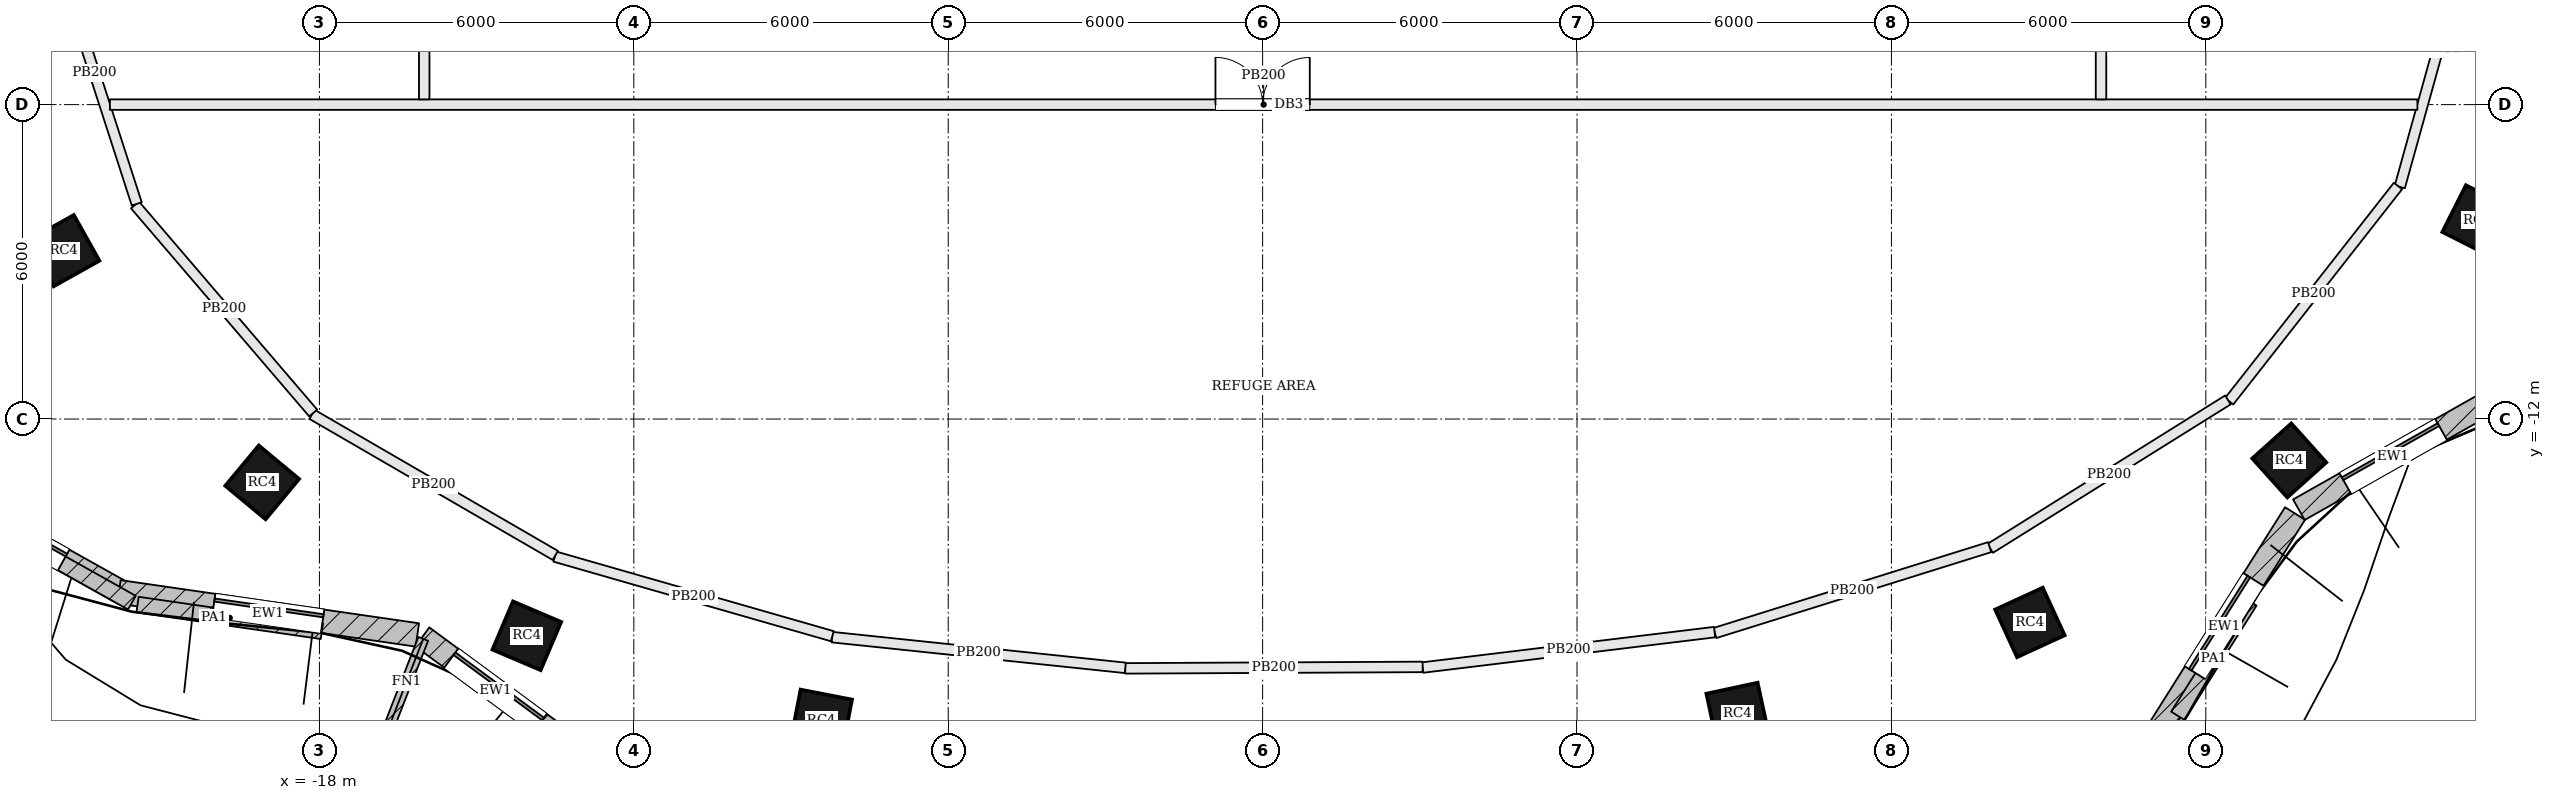
"""IFC4 building model, lengths in metres.
Left out: names, types, materials, properties, quantities, classifications, styles, units other than length and angle.
Written with IfcOpenShell. Run it as: python <this file> out.ifc"""

import sys

from ifc_helpers import new_model, si_unit, direction, frame, frame_2d, origin, origin_2d, place, context, subcontext, project, spatial, rectangle, extrude, element, fill, save


model = new_model("IFC4")
c1 = context("Model", 3, precision=1e-05, world=origin(), true_north=direction((0.0, 1.0)))
c2 = subcontext(c1, "Body", "Model", "MODEL_VIEW")
j1 = project(units=[si_unit("LENGTHUNIT", "METRE"), si_unit("PLANEANGLEUNIT", "RADIAN")], contexts=[c1])
p1 = place(None, origin())
s1 = spatial("IfcSite", under=j1, at=p1, CompositionType="ELEMENT")
p2 = place(p1, origin())
s2 = spatial("IfcBuilding", under=s1, at=p2, CompositionType="ELEMENT")
p3 = place(p2, frame((0.0, 0.0, 193.5)))
s3 = spatial("IfcBuildingStorey", under=s2, at=p3, CompositionType="ELEMENT", Elevation=193.5)
for number, where, z_axis, x_axis in (
    (1, (-22.879, -8.787, 0.0), (0.0, 0.0, 1.0), (0.489, -0.873, 0.0)),
    (2, (-19.092, -13.209, 0.0), (0.0, 0.0, 1.0), (0.769, -0.639, 0.0)),
    (3, (-14.042, -16.136, 0.0), (0.0, 0.0, 1.0), (0.92, -0.392, 0.0)),
    (4, (-8.422, -17.749, 0.0), (0.0, 0.0, 1.0), (0.982, -0.191, 0.0)),
    (5, (9.063, -17.625, 0.0), (0.0, 0.0, 1.0), (0.978, 0.21, 0.0)),
    (6, (14.643, -15.881, 0.0), (0.0, 0.0, 1.0), (0.909, 0.417, 0.0)),
    (7, (19.593, -12.79, 0.0), (0.0, 0.0, 1.0), (0.744, 0.668, 0.0)),
    (8, (23.185, -8.21, 0.0), (0.0, 0.0, 1.0), (0.451, 0.893, 0.0)),
):
    element("IfcColumn", number, at=place(p3, frame(where, z_axis=z_axis, x_axis=x_axis)), inside=s3, PredefinedType="COLUMN", context=c2, shape_type="SweptSolid", body=[
        extrude(rectangle(XDim=1.0, YDim=1.0, at=origin_2d()), origin(), (0.0, 0.0, 1.0), 3.9),
    ])
p4 = place(p3, frame((-25.844, -13.028, 0.0), z_axis=(0.0, 0.0, 1.0), x_axis=(0.872346398261, -0.488888291373, 0.0)))
e9 = element("IfcWall", 9, at=p4, inside=s3, PredefinedType="SOLIDWALL", context=c2, shape_type="SweptSolid", body=[
    extrude(rectangle(XDim=4.696, YDim=0.45, at=frame_2d((2.348, 0.0))), origin(), (0.0, 0.0, 1.0), 3.7),
])
p5 = place(p4, frame((1.298, 0.0, 0.9)))
e10 = element("IfcOpeningElement", 10, at=p5, cuts=e9, PredefinedType="OPENING", context=c2, shape_type="SweptSolid", body=[
    extrude(rectangle(XDim=2.1, YDim=2.3, at=frame_2d((1.05, 1.15))), frame((0.0, 0.235, 0.0), z_axis=(0.0, -1.0, 0.0), x_axis=(1.0, 0.0, 0.0)), (0.0, 0.0, 1.0), 0.47),
])
p6 = place(p3, frame((-21.825, -15.297, 0.0), z_axis=(0.0, 0.0, 1.0), x_axis=(0.98971474215, -0.143054986527, 0.0)))
e11 = element("IfcWall", 11, at=p6, inside=s3, PredefinedType="SOLIDWALL", context=c2, shape_type="SweptSolid", body=[
    extrude(rectangle(XDim=5.753, YDim=0.45, at=frame_2d((2.876, 0.0))), origin(), (0.0, 0.0, 1.0), 3.7),
])
p7 = place(p6, frame((1.826, 0.0, 0.9)))
e12 = element("IfcOpeningElement", 12, at=p7, cuts=e11, PredefinedType="OPENING", context=c2, shape_type="SweptSolid", body=[
    extrude(rectangle(XDim=2.1, YDim=2.3, at=frame_2d((1.05, 1.15))), frame((0.0, 0.235, 0.0), z_axis=(0.0, -1.0, 0.0), x_axis=(1.0, 0.0, 0.0)), (0.0, 0.0, 1.0), 0.47),
])
p8 = place(p3, frame((-16.036, -16.158, 0.0), z_axis=(0.0, 0.0, 1.0), x_axis=(0.805181432967, -0.593028549064, 0.0)))
e13 = element("IfcWall", 13, at=p8, inside=s3, PredefinedType="SOLIDWALL", context=c2, shape_type="SweptSolid", body=[
    extrude(rectangle(XDim=3.469, YDim=0.45, at=frame_2d((1.734, 0.0))), origin(), (0.0, 0.0, 1.0), 3.7),
])
p9 = place(p8, frame((0.684, 0.0, 0.9)))
e14 = element("IfcOpeningElement", 14, at=p9, cuts=e13, PredefinedType="OPENING", context=c2, shape_type="SweptSolid", body=[
    extrude(rectangle(XDim=2.1, YDim=2.3, at=frame_2d((1.05, 1.15))), frame((0.0, 0.235, 0.0), z_axis=(0.0, -1.0, 0.0), x_axis=(1.0, 0.0, 0.0)), (0.0, 0.0, 1.0), 0.47),
])
p10 = place(p3, frame((16.998, -18.099, 0.0), z_axis=(0.0, 0.0, 1.0), x_axis=(0.532745661304, 0.846275404559, 0.0)))
e15 = element("IfcWall", 15, at=p10, inside=s3, PredefinedType="SOLIDWALL", context=c2, shape_type="SweptSolid", body=[
    extrude(rectangle(XDim=5.076, YDim=0.45, at=frame_2d((2.538, 0.0))), origin(), (0.0, 0.0, 1.0), 3.7),
])
p11 = place(p10, frame((1.488, 0.0, 0.9)))
e16 = element("IfcOpeningElement", 16, at=p11, cuts=e15, PredefinedType="OPENING", context=c2, shape_type="SweptSolid", body=[
    extrude(rectangle(XDim=2.1, YDim=2.3, at=frame_2d((1.05, 1.15))), frame((0.0, 0.235, 0.0), z_axis=(0.0, -1.0, 0.0), x_axis=(1.0, 0.0, 0.0)), (0.0, 0.0, 1.0), 0.47),
])
p12 = place(p3, frame((19.776, -13.731, 0.0), z_axis=(0.0, 0.0, 1.0), x_axis=(0.870610133829, 0.491973571318, 0.0)))
e17 = element("IfcWall", 17, at=p12, inside=s3, PredefinedType="SOLIDWALL", context=c2, shape_type="SweptSolid", body=[
    extrude(rectangle(XDim=4.134, YDim=0.45, at=frame_2d((2.067, 0.0))), origin(), (0.0, 0.0, 1.0), 3.7),
])
p13 = place(p12, frame((1.017, 0.0, 0.9)))
e18 = element("IfcOpeningElement", 18, at=p13, cuts=e17, PredefinedType="OPENING", context=c2, shape_type="SweptSolid", body=[
    extrude(rectangle(XDim=2.1, YDim=2.3, at=frame_2d((1.05, 1.15))), frame((0.0, 0.235, 0.0), z_axis=(0.0, -1.0, 0.0), x_axis=(1.0, 0.0, 0.0)), (0.0, 0.0, 1.0), 0.47),
])
p14 = place(p3, frame((-16.019, -16.195, 0.0), z_axis=(0.0, 0.0, 1.0), x_axis=(-0.362641522028, -0.931928713208, 0.0)))
e19 = element("IfcWall", 19, at=p14, inside=s3, PredefinedType="SOLIDWALL", context=c2, shape_type="SweptSolid", body=[
    extrude(rectangle(XDim=1.75, YDim=0.2, at=frame_2d((0.875, 0.0))), origin(), (0.0, 0.0, 1.0), 3.7),
])
p15 = place(p3, frame((-25.734, -13.176, 3.9), z_axis=(0.0, 0.0, 1.0), x_axis=(0.872345142407, -0.488890532245, 0.0)))
e20 = element("IfcWall", 20, at=p15, inside=s3, PredefinedType="PARAPET", context=c2, shape_type="SweptSolid", body=[
    extrude(rectangle(XDim=4.763, YDim=0.3, at=frame_2d((2.381, 0.0))), origin(), (0.0, 0.0, 1.0), 1.1),
])
p16 = place(p3, frame((-21.471, -15.541, 3.9), z_axis=(0.0, 0.0, 1.0), x_axis=(0.989713234374, -0.143065417571, 0.0)))
e21 = element("IfcWall", 21, at=p16, inside=s3, PredefinedType="PARAPET", context=c2, shape_type="SweptSolid", body=[
    extrude(rectangle(XDim=3.555, YDim=0.3, at=frame_2d((1.777, 0.0))), origin(), (0.0, 0.0, 1.0), 1.1),
])
p17 = place(p3, frame((17.466, -17.664, 3.9), z_axis=(0.0, 0.0, 1.0), x_axis=(0.532743008157, 0.846277074758, 0.0)))
e22 = element("IfcWall", 22, at=p17, inside=s3, PredefinedType="PARAPET", context=c2, shape_type="SweptSolid", body=[
    extrude(rectangle(XDim=2.581, YDim=0.3, at=frame_2d((1.29, 0.0))), origin(), (0.0, 0.0, 1.0), 1.1),
])
p18 = place(p3, frame((23.167, -2.295, 0.0), z_axis=(0.0, 0.0, 1.0), x_axis=(-0.267604764515, -0.963528769684, 0.0)))
e23 = element("IfcWall", 23, at=p18, inside=s3, PredefinedType="PARTITIONING", context=c2, shape_type="SweptSolid", body=[
    extrude(rectangle(XDim=5.475, YDim=0.2, at=frame_2d((2.737, 0.0))), origin(), (0.0, 0.0, 1.0), 3.7),
])
p19 = place(p3, frame((21.667, -7.553, 0.0), z_axis=(0.0, 0.0, 1.0), x_axis=(-0.617143909163, -0.786850300491, 0.0)))
e24 = element("IfcWall", 24, at=p19, inside=s3, PredefinedType="PARTITIONING", context=c2, shape_type="SweptSolid", body=[
    extrude(rectangle(XDim=5.221, YDim=0.2, at=frame_2d((2.61, 0.0))), origin(), (0.0, 0.0, 1.0), 3.7),
])
p20 = place(p3, frame((18.422, -11.635, 0.0), z_axis=(0.0, 0.0, 1.0), x_axis=(-0.848223876435, -0.529637853108, 0.0)))
e25 = element("IfcWall", 25, at=p20, inside=s3, PredefinedType="PARTITIONING", context=c2, shape_type="SweptSolid", body=[
    extrude(rectangle(XDim=5.349, YDim=0.2, at=frame_2d((2.674, 0.0))), origin(), (0.0, 0.0, 1.0), 3.7),
])
p21 = place(p3, frame((13.875, -14.445, 0.0), z_axis=(0.0, 0.0, 1.0), x_axis=(-0.954489463941, -0.298244636541, 0.0)))
e26 = element("IfcWall", 26, at=p21, inside=s3, PredefinedType="PARTITIONING", context=c2, shape_type="SweptSolid", body=[
    extrude(rectangle(XDim=5.495, YDim=0.2, at=frame_2d((2.748, 0.0))), origin(), (0.0, 0.0, 1.0), 3.7),
])
p22 = place(p3, frame((8.626, -16.066, 0.0), z_axis=(0.0, 0.0, 1.0), x_axis=(-0.992720392358, -0.120441780942, 0.0)))
e27 = element("IfcWall", 27, at=p22, inside=s3, PredefinedType="PARTITIONING", context=c2, shape_type="SweptSolid", body=[
    extrude(rectangle(XDim=5.613, YDim=0.2, at=frame_2d((2.806, 0.0))), origin(), (0.0, 0.0, 1.0), 3.7),
])
p23 = place(p3, frame((3.053, -16.73, 0.0), z_axis=(0.0, 0.0, 1.0), x_axis=(-0.999987762334, -0.004947239951, 0.0)))
e28 = element("IfcWall", 28, at=p23, inside=s3, PredefinedType="PARTITIONING", context=c2, shape_type="SweptSolid", body=[
    extrude(rectangle(XDim=5.675, YDim=0.2, at=frame_2d((2.837, 0.0))), origin(), (0.0, 0.0, 1.0), 3.7),
])
p24 = place(p3, frame((-2.621, -16.748, 0.0), z_axis=(0.0, 0.0, 1.0), x_axis=(-0.99455907377, 0.104174127222, 0.0)))
e29 = element("IfcWall", 29, at=p24, inside=s3, PredefinedType="PARTITIONING", context=c2, shape_type="SweptSolid", body=[
    extrude(rectangle(XDim=5.625, YDim=0.2, at=frame_2d((2.812, 0.0))), origin(), (0.0, 0.0, 1.0), 3.7),
])
p25 = place(p3, frame((-8.212, -16.144, 0.0), z_axis=(0.0, 0.0, 1.0), x_axis=(-0.961229052449, 0.275751171762, 0.0)))
e30 = element("IfcWall", 30, at=p25, inside=s3, PredefinedType="PARTITIONING", context=c2, shape_type="SweptSolid", body=[
    extrude(rectangle(XDim=5.509, YDim=0.2, at=frame_2d((2.754, 0.0))), origin(), (0.0, 0.0, 1.0), 3.7),
])
p26 = place(p3, frame((-13.498, -14.603, 0.0), z_axis=(0.0, 0.0, 1.0), x_axis=(-0.865099094035, 0.501600994317, 0.0)))
e31 = element("IfcWall", 31, at=p26, inside=s3, PredefinedType="PARTITIONING", context=c2, shape_type="SweptSolid", body=[
    extrude(rectangle(XDim=5.367, YDim=0.2, at=frame_2d((2.684, 0.0))), origin(), (0.0, 0.0, 1.0), 3.7),
])
p27 = place(p3, frame((-18.119, -11.885, 0.0), z_axis=(0.0, 0.0, 1.0), x_axis=(-0.650510608515, 0.759497168006, 0.0)))
e32 = element("IfcWall", 32, at=p27, inside=s3, PredefinedType="PARTITIONING", context=c2, shape_type="SweptSolid", body=[
    extrude(rectangle(XDim=5.228, YDim=0.2, at=frame_2d((2.614, 0.0))), origin(), (0.0, 0.0, 1.0), 3.7),
])
p28 = place(p3, frame((-21.486, -7.895, 0.0), z_axis=(0.0, 0.0, 1.0), x_axis=(-0.307481575482, 0.951554034587, 0.0)))
e33 = element("IfcWall", 33, at=p28, inside=s3, PredefinedType="PARTITIONING", context=c2, shape_type="SweptSolid", body=[
    extrude(rectangle(XDim=5.259, YDim=0.2, at=frame_2d((2.629, 0.0))), origin(), (0.0, 0.0, 1.0), 3.7),
])
p29 = place(p3, frame((-21.998, -6.0, 0.0), z_axis=(0.0, 0.0, 1.0), x_axis=(1.0, 0.0, 0.0)))
e34 = element("IfcWall", 34, at=p29, inside=s3, PredefinedType="PARTITIONING", context=c2, shape_type="SweptSolid", body=[
    extrude(rectangle(XDim=44.036, YDim=0.2, at=frame_2d((22.018, 0.0))), origin(), (0.0, 0.0, 1.0), 3.7),
])
p30 = place(p29, frame((21.098, 0.0, 0.0)))
e35 = element("IfcOpeningElement", 35, at=p30, cuts=e34, PredefinedType="OPENING", context=c2, shape_type="SweptSolid", body=[
    extrude(rectangle(XDim=1.8, YDim=2.1, at=frame_2d((0.9, 1.05))), frame((0.0, 0.11, 0.0), z_axis=(0.0, -1.0, 0.0), x_axis=(1.0, 0.0, 0.0)), (0.0, 0.0, 1.0), 0.22),
])
p31 = place(p3, frame((-16.0, 13.047, 0.0), z_axis=(0.0, 0.0, 1.0), x_axis=(0.0, -1.0, 0.0)))
e36 = element("IfcWall", 36, at=p31, inside=s3, PredefinedType="PARTITIONING", context=c2, shape_type="SweptSolid", body=[
    extrude(rectangle(XDim=18.947, YDim=0.2, at=frame_2d((9.474, 0.0))), origin(), (0.0, 0.0, 1.0), 3.7),
])
p32 = place(p31, frame((7.647, 0.0, 0.0)))
e37 = element("IfcOpeningElement", 37, at=p32, cuts=e36, PredefinedType="OPENING", context=c2, shape_type="SweptSolid", body=[
    extrude(rectangle(XDim=1.8, YDim=2.1, at=frame_2d((0.9, 1.05))), frame((0.0, 0.11, 0.0), z_axis=(0.0, -1.0, 0.0), x_axis=(1.0, 0.0, 0.0)), (0.0, 0.0, 1.0), 0.22),
])
p33 = place(p3, frame((16.0, -5.9, 0.0), z_axis=(0.0, 0.0, 1.0), x_axis=(0.0, 1.0, 0.0)))
e38 = element("IfcWall", 38, at=p33, inside=s3, PredefinedType="PARTITIONING", context=c2, shape_type="SweptSolid", body=[
    extrude(rectangle(XDim=18.952, YDim=0.2, at=frame_2d((9.476, 0.0))), origin(), (0.0, 0.0, 1.0), 3.7),
])
p34 = place(p33, frame((9.5, 0.0, 0.0)))
e39 = element("IfcOpeningElement", 39, at=p34, cuts=e38, PredefinedType="OPENING", context=c2, shape_type="SweptSolid", body=[
    extrude(rectangle(XDim=1.8, YDim=2.1, at=frame_2d((0.9, 1.05))), frame((0.0, 0.11, 0.0), z_axis=(0.0, -1.0, 0.0), x_axis=(1.0, 0.0, 0.0)), (0.0, 0.0, 1.0), 0.22),
])
p35 = place(p5, origin())
e40 = element("IfcWindow", 40, at=p35, inside=s3, PartitioningType="SINGLE_PANEL", PredefinedType="WINDOW", context=c2, shape_type="SweptSolid", body=[
    extrude(rectangle(XDim=2.1, YDim=2.3, at=frame_2d((1.05, 1.15))), frame((0.0, 0.135, 0.0), z_axis=(0.0, -1.0, 0.0), x_axis=(1.0, 0.0, 0.0)), (0.0, 0.0, 1.0), 0.06),
])
fill(e10, e40)
p36 = place(p7, origin())
e41 = element("IfcWindow", 41, at=p36, inside=s3, PartitioningType="SINGLE_PANEL", PredefinedType="WINDOW", context=c2, shape_type="SweptSolid", body=[
    extrude(rectangle(XDim=2.1, YDim=2.3, at=frame_2d((1.05, 1.15))), frame((0.0, 0.135, 0.0), z_axis=(0.0, -1.0, 0.0), x_axis=(1.0, 0.0, 0.0)), (0.0, 0.0, 1.0), 0.06),
])
fill(e12, e41)
p37 = place(p9, origin())
e42 = element("IfcWindow", 42, at=p37, inside=s3, PartitioningType="SINGLE_PANEL", PredefinedType="WINDOW", context=c2, shape_type="SweptSolid", body=[
    extrude(rectangle(XDim=2.1, YDim=2.3, at=frame_2d((1.05, 1.15))), frame((0.0, 0.135, 0.0), z_axis=(0.0, -1.0, 0.0), x_axis=(1.0, 0.0, 0.0)), (0.0, 0.0, 1.0), 0.06),
])
fill(e14, e42)
p38 = place(p11, origin())
e43 = element("IfcWindow", 43, at=p38, inside=s3, PartitioningType="SINGLE_PANEL", PredefinedType="WINDOW", context=c2, shape_type="SweptSolid", body=[
    extrude(rectangle(XDim=2.1, YDim=2.3, at=frame_2d((1.05, 1.15))), frame((0.0, 0.135, 0.0), z_axis=(0.0, -1.0, 0.0), x_axis=(1.0, 0.0, 0.0)), (0.0, 0.0, 1.0), 0.06),
])
fill(e16, e43)
p39 = place(p13, origin())
e44 = element("IfcWindow", 44, at=p39, inside=s3, PartitioningType="SINGLE_PANEL", PredefinedType="WINDOW", context=c2, shape_type="SweptSolid", body=[
    extrude(rectangle(XDim=2.1, YDim=2.3, at=frame_2d((1.05, 1.15))), frame((0.0, 0.135, 0.0), z_axis=(0.0, -1.0, 0.0), x_axis=(1.0, 0.0, 0.0)), (0.0, 0.0, 1.0), 0.06),
])
fill(e18, e44)
p40 = place(p30, origin())
e45 = element("IfcDoor", 45, at=p40, inside=s3, OperationType="DOUBLE_DOOR_SINGLE_SWING", PredefinedType="DOOR", context=c2, shape_type="SweptSolid", body=[
    extrude(rectangle(XDim=1.8, YDim=2.1, at=frame_2d((0.9, 1.05))), frame((0.0, 0.025, 0.0), z_axis=(0.0, -1.0, 0.0), x_axis=(1.0, 0.0, 0.0)), (0.0, 0.0, 1.0), 0.05),
])
fill(e35, e45)
save(model, sys.argv[1])
